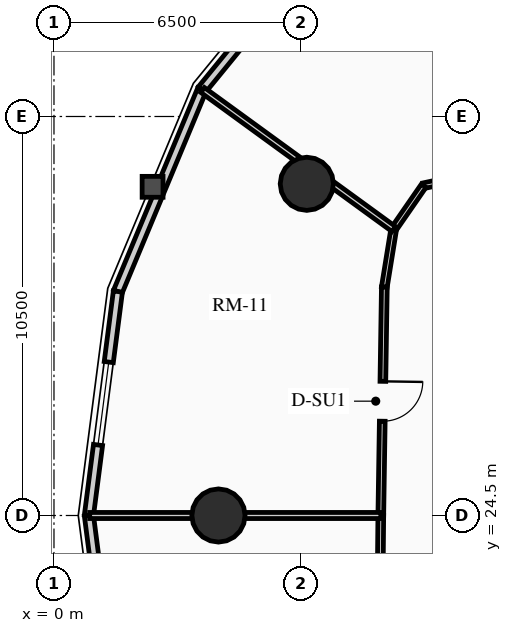
"""IFC4 building model, lengths in metres.
Left out: names, types, materials, properties, quantities, classifications, styles, units other than length and angle.
Written with IfcOpenShell. Run it as: python <this file> out.ifc"""

import sys

from ifc_helpers import new_model, si_unit, direction, frame, frame_2d, origin, origin_2d, place, context, subcontext, project, spatial, rectangle, circle, extrude, source, transform, mapped, element, fill, save


model = new_model("IFC4")
c1 = context("Model", 3, precision=1e-05, world=origin(), true_north=direction((0.0, 1.0)))
c2 = subcontext(c1, "Body", "Model", "MODEL_VIEW")
j1 = project(units=[si_unit("LENGTHUNIT", "METRE"), si_unit("PLANEANGLEUNIT", "RADIAN")], contexts=[c1])
p1 = place(None, origin())
s1 = spatial("IfcSite", under=j1, at=p1, CompositionType="ELEMENT")
p2 = place(p1, origin())
s2 = spatial("IfcBuilding", under=s1, at=p2, CompositionType="ELEMENT")
p3 = place(p2, frame((0.0, 0.0, 122.53)))
s3 = spatial("IfcBuildingStorey", under=s2, at=p3, CompositionType="ELEMENT", Elevation=122.53)
for number, where, z_axis, x_axis in (
    (1, (6.653, 33.229, 0.0), (0.0, 0.0, 1.0), (1.0, 0.0, 0.0)),
    (2, (4.328, 24.5, 0.0), (0.0, 0.0, 1.0), (1.0, 0.0, 0.0)),
):
    element("IfcColumn", number, at=place(p3, frame(where, z_axis=z_axis, x_axis=x_axis)), inside=s3, PredefinedType="USERDEFINED", context=c2, shape_type="SweptSolid", body=[
        extrude(circle(Radius=0.7, at=origin_2d()), origin(), (0.0, 0.0, 1.0), 2.91),
    ])
p4 = place(p3, frame((3.895, 35.709, 0.0), z_axis=(0.0, 0.0, 1.0), x_axis=(0.632700781152, 0.77439635945, 0.0)))
e3 = element("IfcWall", 3, at=p4, inside=s3, PredefinedType="SOLIDWALL", context=c2, shape_type="SweptSolid", body=[
    extrude(rectangle(XDim=5.448, YDim=0.24, at=frame_2d((2.724, 0.0))), origin(), (0.0, 0.0, 1.0), 2.139),
])
m1 = source(origin(), c2, "Body", "SweptSolid", [
    extrude(rectangle(XDim=1.9, YDim=1.35, at=frame_2d((0.95, 0.675))), frame((0.0, 0.13, 0.0), z_axis=(0.0, -1.0, 0.0), x_axis=(1.0, 0.0, 0.0)), (0.0, 0.0, 1.0), 0.26),
])
p5 = place(p4, frame((1.774, 0.0, 0.65)))
e4 = element("IfcOpeningElement", 4, at=p5, cuts=e3, PredefinedType="OPENING", context=c2, shape_type="MappedRepresentation", body=[
    mapped(m1, transform((0.0, 0.0, 0.0), x_axis=(1.0, 0.0, 0.0), y_axis=(0.0, 1.0, 0.0), z_axis=(0.0, 0.0, 1.0), scale=1.0)),
])
p6 = place(p3, frame((1.682, 30.393, 0.0), z_axis=(0.0, 0.0, 1.0), x_axis=(0.384344417632, 0.923189779317, 0.0)))
e5 = element("IfcWall", 5, at=p6, inside=s3, PredefinedType="SOLIDWALL", context=c2, shape_type="SweptSolid", body=[
    extrude(rectangle(XDim=5.758, YDim=0.24, at=frame_2d((2.879, 0.0))), origin(), (0.0, 0.0, 1.0), 2.139),
])
p7 = place(p3, frame((0.919, 24.5, 0.0), z_axis=(0.0, 0.0, 1.0), x_axis=(0.128351991996, 0.991728675672, 0.0)))
e6 = element("IfcWall", 6, at=p7, inside=s3, PredefinedType="SOLIDWALL", context=c2, shape_type="SweptSolid", body=[
    extrude(rectangle(XDim=5.942, YDim=0.24, at=frame_2d((2.971, 0.0))), origin(), (0.0, 0.0, 1.0), 2.139),
])
m2 = source(origin(), c2, "Body", "SweptSolid", [
    extrude(rectangle(XDim=2.2, YDim=1.35, at=frame_2d((1.1, 0.675))), frame((0.0, 0.13, 0.0), z_axis=(0.0, -1.0, 0.0), x_axis=(1.0, 0.0, 0.0)), (0.0, 0.0, 1.0), 0.26),
])
p8 = place(p7, frame((1.871, 0.0, 0.65)))
e7 = element("IfcOpeningElement", 7, at=p8, cuts=e6, PredefinedType="OPENING", context=c2, shape_type="MappedRepresentation", body=[
    mapped(m2, transform((0.0, 0.0, 0.0), x_axis=(1.0, 0.0, 0.0), y_axis=(0.0, 1.0, 0.0), z_axis=(0.0, 0.0, 1.0), scale=1.0)),
])
p9 = place(p3, frame((1.682, 18.607, 0.0), z_axis=(0.0, 0.0, 1.0), x_axis=(-0.128351991996, 0.991728675672, 0.0)))
e8 = element("IfcWall", 8, at=p9, inside=s3, PredefinedType="SOLIDWALL", context=c2, shape_type="SweptSolid", body=[
    extrude(rectangle(XDim=5.942, YDim=0.24, at=frame_2d((2.971, 0.0))), origin(), (0.0, 0.0, 1.0), 2.139),
])
p10 = place(p3, frame((11.62, 33.588, 0.0), z_axis=(0.0, 0.0, 1.0), x_axis=(-0.977392314559, -0.211433827571, 0.0)))
e9 = element("IfcWall", 9, at=p10, inside=s3, PredefinedType="PARTITIONING", context=c2, shape_type="SweptSolid", body=[
    extrude(rectangle(XDim=1.934, YDim=0.15, at=frame_2d((0.967, 0.0))), origin(), (0.0, 0.0, 1.0), 2.185),
])
p11 = place(p3, frame((9.729, 33.179, 0.0), z_axis=(0.0, 0.0, 1.0), x_axis=(-0.569155068352, -0.822230203878, 0.0)))
e10 = element("IfcWall", 10, at=p11, inside=s3, PredefinedType="PARTITIONING", context=c2, shape_type="SweptSolid", body=[
    extrude(rectangle(XDim=1.387, YDim=0.15, at=frame_2d((0.694, 0.0))), origin(), (0.0, 0.0, 1.0), 2.185),
])
p12 = place(p3, frame((8.94, 32.038, 0.0), z_axis=(0.0, 0.0, 1.0), x_axis=(-0.159917336462, -0.987130409571, 0.0)))
e11 = element("IfcWall", 11, at=p12, inside=s3, PredefinedType="PARTITIONING", context=c2, shape_type="SweptSolid", body=[
    extrude(rectangle(XDim=1.547, YDim=0.15, at=frame_2d((0.773, 0.0))), origin(), (0.0, 0.0, 1.0), 2.185),
])
p13 = place(p3, frame((8.693, 30.512, 0.0), z_axis=(0.0, 0.0, 1.0), x_axis=(-0.015389665197, -0.99988157209, 0.0)))
e12 = element("IfcWall", 12, at=p13, inside=s3, PredefinedType="PARTITIONING", context=c2, shape_type="SweptSolid", body=[
    extrude(rectangle(XDim=6.012, YDim=0.15, at=frame_2d((3.006, 0.0))), origin(), (0.0, 0.0, 1.0), 2.615),
])
m3 = source(origin(), c2, "Body", "SweptSolid", [
    extrude(rectangle(XDim=1.05, YDim=2.015, at=frame_2d((0.525, 1.007))), frame((0.0, 0.085, 0.0), z_axis=(0.0, -1.0, 0.0), x_axis=(1.0, 0.0, 0.0)), (0.0, 0.0, 1.0), 0.17),
])
p14 = place(p13, frame((2.481, 0.0, 0.0)))
e13 = element("IfcOpeningElement", 13, at=p14, cuts=e12, PredefinedType="OPENING", context=c2, shape_type="MappedRepresentation", body=[
    mapped(m3, transform((0.0, 0.0, 0.0), x_axis=(1.0, 0.0, 0.0), y_axis=(0.0, 1.0, 0.0), z_axis=(0.0, 0.0, 1.0), scale=1.0)),
])
p15 = place(p3, frame((8.6, 24.5, 0.0), z_axis=(0.0, 0.0, 1.0), x_axis=(-0.010076760723, -0.999949228158, 0.0)))
e14 = element("IfcWall", 14, at=p15, inside=s3, PredefinedType="PARTITIONING", context=c2, shape_type="SweptSolid", body=[
    extrude(rectangle(XDim=6.13, YDim=0.15, at=frame_2d((3.065, 0.0))), origin(), (0.0, 0.0, 1.0), 2.185),
])
p16 = place(p3, frame((8.94, 32.038, 0.0), z_axis=(0.0, 0.0, 1.0), x_axis=(-0.808625730058, 0.588323404844, 0.0)))
e15 = element("IfcWall", 15, at=p16, inside=s3, PredefinedType="PARTITIONING", context=c2, shape_type="SweptSolid", body=[
    extrude(rectangle(XDim=6.219, YDim=0.16, at=frame_2d((3.11, 0.0))), origin(), (0.0, 0.0, 1.0), 2.139),
])
p17 = place(p3, frame((8.6, 24.5, 0.0), z_axis=(0.0, 0.0, 1.0), x_axis=(-1.0, 0.0, 0.0)))
e16 = element("IfcWall", 16, at=p17, inside=s3, PredefinedType="PARTITIONING", context=c2, shape_type="SweptSolid", body=[
    extrude(rectangle(XDim=7.661, YDim=0.16, at=frame_2d((3.831, 0.0))), origin(), (0.0, 0.0, 1.0), 2.139),
])
m4 = source(origin(), c2, "Body", "SweptSolid", [
    extrude(rectangle(XDim=2.2, YDim=1.35, at=frame_2d((1.1, 0.675))), frame((0.0, 0.03, 0.0), z_axis=(0.0, -1.0, 0.0), x_axis=(1.0, 0.0, 0.0)), (0.0, 0.0, 1.0), 0.06),
])
p18 = place(p8, origin())
e17 = element("IfcWindow", 17, at=p18, inside=s3, PartitioningType="DOUBLE_PANEL_VERTICAL", PredefinedType="WINDOW", context=c2, shape_type="MappedRepresentation", body=[
    mapped(m4, transform((0.0, 0.0, 0.0), x_axis=(1.0, 0.0, 0.0), y_axis=(0.0, 1.0, 0.0), z_axis=(0.0, 0.0, 1.0), scale=1.0)),
])
fill(e7, e17)
m5 = source(origin(), c2, "Body", "SweptSolid", [
    extrude(rectangle(XDim=1.05, YDim=2.015, at=frame_2d((0.525, 1.007))), frame((0.0, 0.025, 0.0), z_axis=(0.0, -1.0, 0.0), x_axis=(1.0, 0.0, 0.0)), (0.0, 0.0, 1.0), 0.05),
])
p19 = place(p14, origin())
e18 = element("IfcDoor", 18, at=p19, inside=s3, OperationType="SINGLE_SWING_LEFT", PredefinedType="DOOR", context=c2, shape_type="MappedRepresentation", body=[
    mapped(m5, transform((0.0, 0.0, 0.0), x_axis=(1.0, 0.0, 0.0), y_axis=(0.0, 1.0, 0.0), z_axis=(0.0, 0.0, 1.0), scale=1.0)),
])
fill(e13, e18)
save(model, sys.argv[1])
